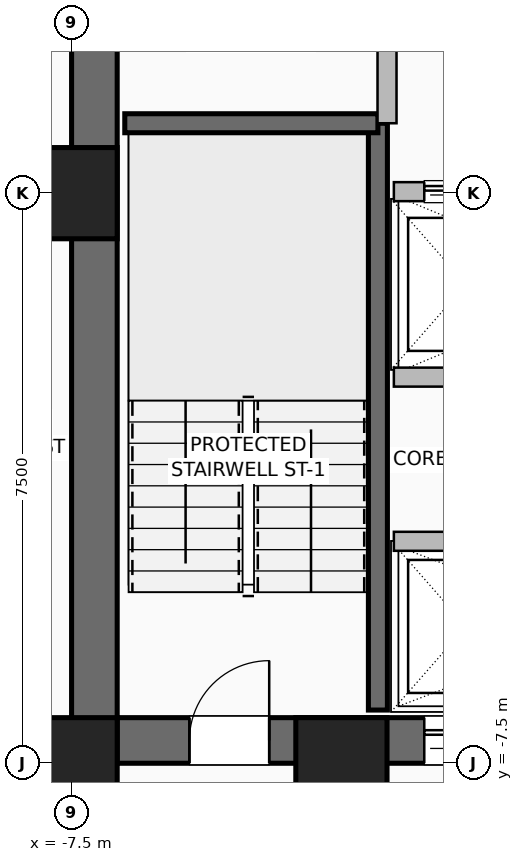
"""IFC4 building model, lengths in metres.
Left out: names, types, materials, properties, quantities, classifications, styles, units other than length and angle.
Written with IfcOpenShell. Run it as: python <this file> out.ifc"""

import sys

from ifc_helpers import new_model, si_unit, direction, frame, frame_2d, origin, origin_2d, place, context, subcontext, project, spatial, rectangle, hollow_rectangle, extrude, element, fill, save


model = new_model("IFC4")
c1 = context("Model", 3, precision=1e-05, world=origin(), true_north=direction((0.0, 1.0)))
c2 = subcontext(c1, "Body", "Model", "MODEL_VIEW")
j1 = project(units=[si_unit("LENGTHUNIT", "METRE"), si_unit("PLANEANGLEUNIT", "RADIAN")], contexts=[c1])
p1 = place(None, origin())
s1 = spatial("IfcSite", under=j1, at=p1, CompositionType="ELEMENT")
p2 = place(p1, origin())
s2 = spatial("IfcBuilding", under=s1, at=p2, CompositionType="ELEMENT")
p3 = place(p2, frame((0.0, 0.0, 79.5)))
s3 = spatial("IfcBuildingStorey", under=s2, at=p3, CompositionType="ELEMENT", Elevation=79.5)
for number, where, z_axis, x_axis in (
    (1, (-7.5, -7.5, 0.0), (0.0, 0.0, 1.0), (1.0, 0.0, 0.0)),
    (2, (-3.95, -7.5, 0.0), (0.0, 0.0, 1.0), (1.0, 0.0, 0.0)),
    (3, (-7.5, 0.0, 0.0), (0.0, 0.0, 1.0), (1.0, 0.0, 0.0)),
):
    element("IfcColumn", number, at=place(p3, frame(where, z_axis=z_axis, x_axis=x_axis)), inside=s3, PredefinedType="COLUMN", context=c2, shape_type="SweptSolid", body=[
        extrude(hollow_rectangle(XDim=1.2, YDim=1.2, WallThickness=0.055, at=origin_2d()), origin(), (0.0, 0.0, 1.0), 3.5),
    ])
p4 = place(p3, frame((-7.5, -7.2, 0.0), z_axis=(0.0, 0.0, 1.0), x_axis=(1.0, 0.0, 0.0)))
e4 = element("IfcWall", 4, at=p4, inside=s3, PredefinedType="SHEAR", context=c2, shape_type="SweptSolid", body=[
    extrude(rectangle(XDim=15.0, YDim=0.6, at=frame_2d((7.5, 0.0))), origin(), (0.0, 0.0, 1.0), 3.15),
])
p5 = place(p4, frame((1.55, 0.0, 0.0)))
e5 = element("IfcOpeningElement", 5, at=p5, cuts=e4, PredefinedType="OPENING", context=c2, shape_type="SweptSolid", body=[
    extrude(rectangle(XDim=1.05, YDim=2.08, at=frame_2d((0.525, 1.04))), frame((0.0, 0.31, 0.0), z_axis=(0.0, -1.0, 0.0), x_axis=(1.0, 0.0, 0.0)), (0.0, 0.0, 1.0), 0.62),
])
p6 = place(p4, frame((12.4, 0.0, 0.0)))
e6 = element("IfcOpeningElement", 6, at=p6, cuts=e4, PredefinedType="OPENING", context=c2, shape_type="SweptSolid", body=[
    extrude(rectangle(XDim=1.05, YDim=2.08, at=frame_2d((0.525, 1.04))), frame((0.0, 0.31, 0.0), z_axis=(0.0, -1.0, 0.0), x_axis=(1.0, 0.0, 0.0)), (0.0, 0.0, 1.0), 0.62),
])
p7 = place(p4, frame((4.64, 0.0, 0.0)))
e7 = element("IfcOpeningElement", 7, at=p7, cuts=e4, PredefinedType="OPENING", context=c2, shape_type="SweptSolid", body=[
    extrude(rectangle(XDim=1.1, YDim=2.2, at=frame_2d((0.55, 1.1))), frame((0.0, 0.31, 0.0), z_axis=(0.0, -1.0, 0.0), x_axis=(1.0, 0.0, 0.0)), (0.0, 0.0, 1.0), 0.62),
])
p8 = place(p4, frame((6.52, 0.0, 0.0)))
e8 = element("IfcOpeningElement", 8, at=p8, cuts=e4, PredefinedType="OPENING", context=c2, shape_type="SweptSolid", body=[
    extrude(rectangle(XDim=1.1, YDim=2.2, at=frame_2d((0.55, 1.1))), frame((0.0, 0.31, 0.0), z_axis=(0.0, -1.0, 0.0), x_axis=(1.0, 0.0, 0.0)), (0.0, 0.0, 1.0), 0.62),
])
p9 = place(p4, frame((8.4, 0.0, 0.0)))
e9 = element("IfcOpeningElement", 9, at=p9, cuts=e4, PredefinedType="OPENING", context=c2, shape_type="SweptSolid", body=[
    extrude(rectangle(XDim=1.1, YDim=2.2, at=frame_2d((0.55, 1.1))), frame((0.0, 0.31, 0.0), z_axis=(0.0, -1.0, 0.0), x_axis=(1.0, 0.0, 0.0)), (0.0, 0.0, 1.0), 0.62),
])
p10 = place(p3, frame((-7.2, -7.5, 0.0), z_axis=(0.0, 0.0, 1.0), x_axis=(0.0, 1.0, 0.0)))
e10 = element("IfcWall", 10, at=p10, inside=s3, PredefinedType="SHEAR", context=c2, shape_type="SweptSolid", body=[
    extrude(rectangle(XDim=15.0, YDim=0.6, at=frame_2d((7.5, 0.0))), origin(), (0.0, 0.0, 1.0), 3.15),
])
p11 = place(p10, frame((9.5, 0.0, 0.0)))
e11 = element("IfcOpeningElement", 11, at=p11, cuts=e10, PredefinedType="OPENING", context=c2, shape_type="SweptSolid", body=[
    extrude(rectangle(XDim=1.0, YDim=2.08, at=frame_2d((0.5, 1.04))), frame((0.0, 0.31, 0.0), z_axis=(0.0, -1.0, 0.0), x_axis=(1.0, 0.0, 0.0)), (0.0, 0.0, 1.0), 0.62),
])
p12 = place(p3, frame((-3.47, -6.8, 0.0), z_axis=(0.0, 0.0, 1.0), x_axis=(0.0, 1.0, 0.0)))
e12 = element("IfcWall", 12, at=p12, inside=s3, PredefinedType="SHEAR", context=c2, shape_type="SweptSolid", body=[
    extrude(rectangle(XDim=7.72, YDim=0.25, at=frame_2d((3.86, 0.0))), origin(), (0.0, 0.0, 1.0), 3.15),
])
p13 = place(p3, frame((-6.8, 0.92, 0.0), z_axis=(0.0, 0.0, 1.0), x_axis=(1.0, 0.0, 0.0)))
e13 = element("IfcWall", 13, at=p13, inside=s3, PredefinedType="SHEAR", context=c2, shape_type="SweptSolid", body=[
    extrude(rectangle(XDim=3.33, YDim=0.25, at=frame_2d((1.665, 0.0))), origin(), (0.0, 0.0, 1.0), 3.15),
])
p14 = place(p3, frame((-3.26, -4.58, 0.0), z_axis=(0.0, 0.0, 1.0), x_axis=(1.0, 0.0, 0.0)))
e14 = element("IfcWall", 14, at=p14, inside=s3, PredefinedType="SHEAR", context=c2, shape_type="SweptSolid", body=[
    extrude(rectangle(XDim=5.64, YDim=0.25, at=frame_2d((2.82, 0.0))), origin(), (0.0, 0.0, 1.0), 3.15),
])
p15 = place(p3, frame((-3.26, 0.02, 0.0), z_axis=(0.0, 0.0, 1.0), x_axis=(1.0, 0.0, 0.0)))
e15 = element("IfcWall", 15, at=p15, inside=s3, PredefinedType="SHEAR", context=c2, shape_type="SweptSolid", body=[
    extrude(rectangle(XDim=5.64, YDim=0.25, at=frame_2d((2.82, 0.0))), origin(), (0.0, 0.0, 1.0), 3.15),
])
p16 = place(p15, frame((0.4, 0.0, 0.0)))
e16 = element("IfcOpeningElement", 16, at=p16, cuts=e15, PredefinedType="OPENING", context=c2, shape_type="SweptSolid", body=[
    extrude(rectangle(XDim=1.1, YDim=2.2, at=frame_2d((0.55, 1.1))), frame((0.0, 0.135, 0.0), z_axis=(0.0, -1.0, 0.0), x_axis=(1.0, 0.0, 0.0)), (0.0, 0.0, 1.0), 0.27),
])
p17 = place(p15, frame((2.28, 0.0, 0.0)))
e17 = element("IfcOpeningElement", 17, at=p17, cuts=e15, PredefinedType="OPENING", context=c2, shape_type="SweptSolid", body=[
    extrude(rectangle(XDim=1.1, YDim=2.2, at=frame_2d((0.55, 1.1))), frame((0.0, 0.135, 0.0), z_axis=(0.0, -1.0, 0.0), x_axis=(1.0, 0.0, 0.0)), (0.0, 0.0, 1.0), 0.27),
])
p18 = place(p15, frame((4.16, 0.0, 0.0)))
e18 = element("IfcOpeningElement", 18, at=p18, cuts=e15, PredefinedType="OPENING", context=c2, shape_type="SweptSolid", body=[
    extrude(rectangle(XDim=1.1, YDim=2.2, at=frame_2d((0.55, 1.1))), frame((0.0, 0.135, 0.0), z_axis=(0.0, -1.0, 0.0), x_axis=(1.0, 0.0, 0.0)), (0.0, 0.0, 1.0), 0.27),
])
p19 = place(p3, frame((-3.26, -2.42, 0.0), z_axis=(0.0, 0.0, 1.0), x_axis=(1.0, 0.0, 0.0)))
e19 = element("IfcWall", 19, at=p19, inside=s3, PredefinedType="SHEAR", context=c2, shape_type="SweptSolid", body=[
    extrude(rectangle(XDim=5.64, YDim=0.25, at=frame_2d((2.82, 0.0))), origin(), (0.0, 0.0, 1.0), 3.15),
])
p20 = place(p3, frame((-3.35, 0.92, 0.0), z_axis=(0.0, 0.0, 1.0), x_axis=(0.0, 1.0, 0.0)))
e20 = element("IfcWall", 20, at=p20, inside=s3, PredefinedType="SHEAR", context=c2, shape_type="SweptSolid", body=[
    extrude(rectangle(XDim=3.62, YDim=0.25, at=frame_2d((1.81, 0.0))), origin(), (0.0, 0.0, 1.0), 3.15),
])
p21 = place(p20, frame((1.85, 0.0, 0.0)))
e21 = element("IfcOpeningElement", 21, at=p21, cuts=e20, PredefinedType="OPENING", context=c2, shape_type="SweptSolid", body=[
    extrude(rectangle(XDim=1.0, YDim=2.08, at=frame_2d((0.5, 1.04))), frame((0.0, 0.135, 0.0), z_axis=(0.0, -1.0, 0.0), x_axis=(1.0, 0.0, 0.0)), (0.0, 0.0, 1.0), 0.27),
])
p22 = place(p5, origin())
e22 = element("IfcDoor", 22, at=p22, inside=s3, OperationType="SINGLE_SWING_RIGHT", PredefinedType="DOOR", context=c2, shape_type="SweptSolid", body=[
    extrude(rectangle(XDim=1.05, YDim=2.08, at=frame_2d((0.525, 1.04))), frame((0.0, 0.025, 0.0), z_axis=(0.0, -1.0, 0.0), x_axis=(1.0, 0.0, 0.0)), (0.0, 0.0, 1.0), 0.05),
])
fill(e5, e22)
p23 = place(p7, origin())
e23 = element("IfcDoor", 23, at=p23, inside=s3, OperationType="DOUBLE_DOOR_SLIDING", PredefinedType="DOOR", context=c2, shape_type="SweptSolid", body=[
    extrude(rectangle(XDim=1.1, YDim=2.2, at=frame_2d((0.55, 1.1))), frame((0.0, 0.025, 0.0), z_axis=(0.0, -1.0, 0.0), x_axis=(1.0, 0.0, 0.0)), (0.0, 0.0, 1.0), 0.05),
])
fill(e7, e23)
p24 = place(p16, origin())
e24 = element("IfcDoor", 24, at=p24, inside=s3, OperationType="DOUBLE_DOOR_SLIDING", PredefinedType="DOOR", context=c2, shape_type="SweptSolid", body=[
    extrude(rectangle(XDim=1.1, YDim=2.2, at=frame_2d((0.55, 1.1))), frame((0.0, 0.025, 0.0), z_axis=(0.0, -1.0, 0.0), x_axis=(1.0, 0.0, 0.0)), (0.0, 0.0, 1.0), 0.05),
])
fill(e16, e24)
save(model, sys.argv[1])
